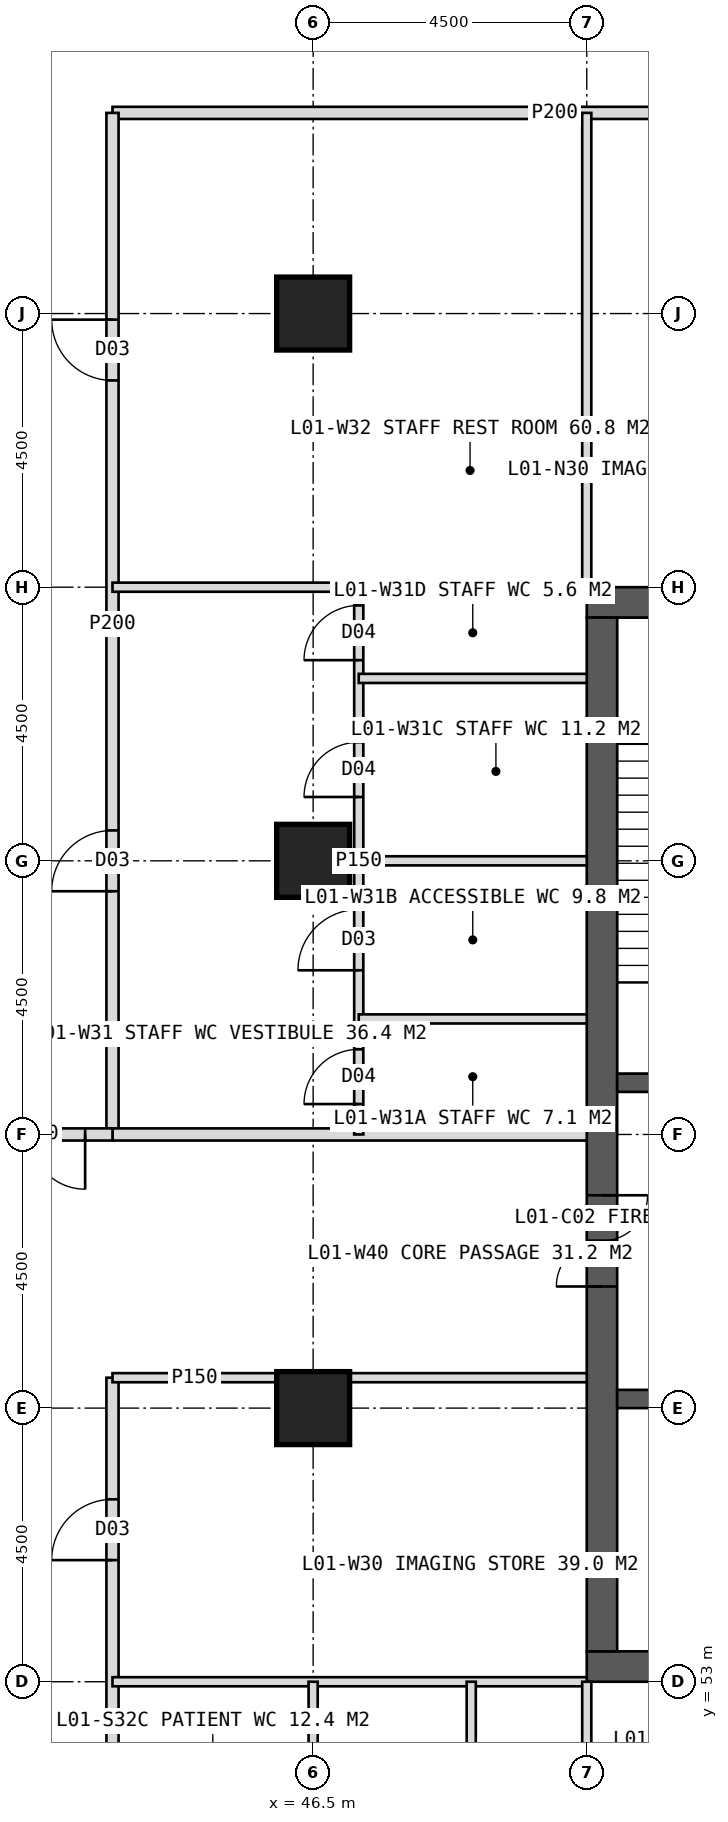
"""IFC4 building model, lengths in metres.
Left out: names, types, materials, properties, quantities, classifications, styles, units other than length and angle.
Written with IfcOpenShell. Run it as: python <this file> out.ifc"""

import sys

from ifc_helpers import new_model, si_unit, direction, frame, frame_2d, origin, origin_2d, place, context, subcontext, project, spatial, rectangle, hollow_rectangle, extrude, element, fill, save


model = new_model("IFC4")
c1 = context("Model", 3, precision=1e-05, world=origin(), true_north=direction((0.0, 1.0)))
c2 = subcontext(c1, "Body", "Model", "MODEL_VIEW")
j1 = project(units=[si_unit("LENGTHUNIT", "METRE"), si_unit("PLANEANGLEUNIT", "RADIAN")], contexts=[c1])
p1 = place(None, origin())
s1 = spatial("IfcSite", under=j1, at=p1, CompositionType="ELEMENT")
p2 = place(p1, origin())
s2 = spatial("IfcBuilding", under=s1, at=p2, CompositionType="ELEMENT")
p3 = place(p2, frame((0.0, 0.0, 6.0)))
s3 = spatial("IfcBuildingStorey", under=s2, at=p3, CompositionType="ELEMENT", Elevation=6.0)
p4 = place(p3, frame((51.0, 70.75, 0.0), z_axis=(0.0, 0.0, 1.0), x_axis=(1.0, 0.0, 0.0)))
e1 = element("IfcWall", 1, at=p4, inside=s3, PredefinedType="SHEAR", context=c2, shape_type="SweptSolid", body=[
    extrude(rectangle(XDim=18.0, YDim=0.5, at=frame_2d((9.0, 0.0))), origin(), (0.0, 0.0, 1.0), 5.0),
])
p5 = place(p4, frame((8.1, 0.0, 0.0)))
e2 = element("IfcOpeningElement", 2, at=p5, cuts=e1, PredefinedType="OPENING", context=c2, shape_type="SweptSolid", body=[
    extrude(rectangle(XDim=1.8, YDim=2.2, at=frame_2d((0.9, 1.1))), frame((0.0, 0.26, 0.0), z_axis=(0.0, -1.0, 0.0), x_axis=(1.0, 0.0, 0.0)), (0.0, 0.0, 1.0), 0.52),
])
p6 = place(p3, frame((51.0, 53.25, 0.0), z_axis=(0.0, 0.0, 1.0), x_axis=(1.0, 0.0, 0.0)))
e3 = element("IfcWall", 3, at=p6, inside=s3, PredefinedType="SHEAR", context=c2, shape_type="SweptSolid", body=[
    extrude(rectangle(XDim=18.0, YDim=0.5, at=frame_2d((9.0, 0.0))), origin(), (0.0, 0.0, 1.0), 5.0),
])
p7 = place(p6, frame((8.1, 0.0, 0.0)))
e4 = element("IfcOpeningElement", 4, at=p7, cuts=e3, PredefinedType="OPENING", context=c2, shape_type="SweptSolid", body=[
    extrude(rectangle(XDim=1.8, YDim=2.2, at=frame_2d((0.9, 1.1))), frame((0.0, 0.26, 0.0), z_axis=(0.0, -1.0, 0.0), x_axis=(1.0, 0.0, 0.0)), (0.0, 0.0, 1.0), 0.52),
])
p8 = place(p3, frame((51.25, 53.5, 0.0), z_axis=(0.0, 0.0, 1.0), x_axis=(0.0, 1.0, 0.0)))
e5 = element("IfcWall", 5, at=p8, inside=s3, PredefinedType="SHEAR", context=c2, shape_type="SweptSolid", body=[
    extrude(rectangle(XDim=17.0, YDim=0.5, at=frame_2d((8.5, 0.0))), origin(), (0.0, 0.0, 1.0), 5.0),
])
p9 = place(p8, frame((6.0, 0.0, 0.0)))
e6 = element("IfcOpeningElement", 6, at=p9, cuts=e5, PredefinedType="OPENING", context=c2, shape_type="SweptSolid", body=[
    extrude(rectangle(XDim=1.5, YDim=2.2, at=frame_2d((0.75, 1.1))), frame((0.0, 0.26, 0.0), z_axis=(0.0, -1.0, 0.0), x_axis=(1.0, 0.0, 0.0)), (0.0, 0.0, 1.0), 0.52),
])
p10 = place(p3, frame((51.5, 62.85, 0.0), z_axis=(0.0, 0.0, 1.0), x_axis=(1.0, 0.0, 0.0)))
e7 = element("IfcWall", 7, at=p10, inside=s3, PredefinedType="SHEAR", context=c2, shape_type="SweptSolid", body=[
    extrude(rectangle(XDim=3.3, YDim=0.3, at=frame_2d((1.65, 0.0))), origin(), (0.0, 0.0, 1.0), 5.0),
])
p11 = place(p10, frame((1.05, 0.0, 0.0)))
e8 = element("IfcOpeningElement", 8, at=p11, cuts=e7, PredefinedType="OPENING", context=c2, shape_type="SweptSolid", body=[
    extrude(rectangle(XDim=1.2, YDim=2.1, at=frame_2d((0.6, 1.05))), frame((0.0, 0.16, 0.0), z_axis=(0.0, -1.0, 0.0), x_axis=(1.0, 0.0, 0.0)), (0.0, 0.0, 1.0), 0.32),
])
p12 = place(p3, frame((51.5, 57.65, 0.0), z_axis=(0.0, 0.0, 1.0), x_axis=(1.0, 0.0, 0.0)))
e9 = element("IfcWall", 9, at=p12, inside=s3, PredefinedType="SHEAR", context=c2, shape_type="SweptSolid", body=[
    extrude(rectangle(XDim=3.3, YDim=0.3, at=frame_2d((1.65, 0.0))), origin(), (0.0, 0.0, 1.0), 5.0),
])
p13 = place(p12, frame((1.05, 0.0, 0.0)))
e10 = element("IfcOpeningElement", 10, at=p13, cuts=e9, PredefinedType="OPENING", context=c2, shape_type="SweptSolid", body=[
    extrude(rectangle(XDim=1.2, YDim=2.2, at=frame_2d((0.6, 1.1))), frame((0.0, 0.16, 0.0), z_axis=(0.0, -1.0, 0.0), x_axis=(1.0, 0.0, 0.0)), (0.0, 0.0, 1.0), 0.32),
])
for number, where, z_axis, x_axis in (
    (11, (46.5, 75.5, 0.0), (0.0, 0.0, 1.0), (1.0, 0.0, 0.0)),
    (12, (46.5, 57.5, 0.0), (0.0, 0.0, 1.0), (1.0, 0.0, 0.0)),
    (13, (46.5, 66.5, 0.0), (0.0, 0.0, 1.0), (1.0, 0.0, 0.0)),
):
    element("IfcColumn", number, at=place(p3, frame(where, z_axis=z_axis, x_axis=x_axis)), inside=s3, PredefinedType="COLUMN", context=c2, shape_type="SweptSolid", body=[
        extrude(hollow_rectangle(XDim=1.2, YDim=1.2, WallThickness=0.1, at=origin_2d()), origin(), (0.0, 0.0, 1.0), 5.0),
    ])
p14 = place(p3, frame((43.2, 78.8, 0.0), z_axis=(0.0, 0.0, 1.0), x_axis=(1.0, 0.0, 0.0)))
e14 = element("IfcWall", 14, at=p14, inside=s3, PredefinedType="PARTITIONING", context=c2, shape_type="SweptSolid", body=[
    extrude(rectangle(XDim=14.55, YDim=0.2, at=frame_2d((7.275, 0.0))), origin(), (0.0, 0.0, 1.0), 4.7),
])
p15 = place(p14, frame((10.675, 0.0, 0.0)))
e15 = element("IfcOpeningElement", 15, at=p15, cuts=e14, PredefinedType="OPENING", context=c2, shape_type="SweptSolid", body=[
    extrude(rectangle(XDim=1.0, YDim=2.1, at=frame_2d((0.5, 1.05))), frame((0.0, 0.11, 0.0), z_axis=(0.0, -1.0, 0.0), x_axis=(1.0, 0.0, 0.0)), (0.0, 0.0, 1.0), 0.22),
])
p16 = place(p3, frame((51.0, 71.0, 0.0), z_axis=(0.0, 0.0, 1.0), x_axis=(0.0, 1.0, 0.0)))
e16 = element("IfcWall", 16, at=p16, inside=s3, PredefinedType="PARTITIONING", context=c2, shape_type="SweptSolid", body=[
    extrude(rectangle(XDim=7.8, YDim=0.15, at=frame_2d((3.9, 0.0))), origin(), (0.0, 0.0, 1.0), 4.7),
])
p17 = place(p3, frame((43.2, 45.2, 0.0), z_axis=(0.0, 0.0, 1.0), x_axis=(0.0, 1.0, 0.0)))
e17 = element("IfcWall", 17, at=p17, inside=s3, PredefinedType="PARTITIONING", context=c2, shape_type="SweptSolid", body=[
    extrude(rectangle(XDim=12.8, YDim=0.2, at=frame_2d((6.4, 0.0))), origin(), (0.0, 0.0, 1.0), 4.7),
])
p18 = place(p17, frame((9.8, 0.0, 0.0)))
e18 = element("IfcOpeningElement", 18, at=p18, cuts=e17, PredefinedType="OPENING", context=c2, shape_type="SweptSolid", body=[
    extrude(rectangle(XDim=1.0, YDim=2.1, at=frame_2d((0.5, 1.05))), frame((0.0, 0.11, 0.0), z_axis=(0.0, -1.0, 0.0), x_axis=(1.0, 0.0, 0.0)), (0.0, 0.0, 1.0), 0.22),
])
p19 = place(p3, frame((43.2, 62.0, 0.0), z_axis=(0.0, 0.0, 1.0), x_axis=(0.0, 1.0, 0.0)))
e19 = element("IfcWall", 19, at=p19, inside=s3, PredefinedType="PARTITIONING", context=c2, shape_type="SweptSolid", body=[
    extrude(rectangle(XDim=16.8, YDim=0.2, at=frame_2d((8.4, 0.0))), origin(), (0.0, 0.0, 1.0), 4.7),
])
p20 = place(p19, frame((4.0, 0.0, 0.0)))
e20 = element("IfcOpeningElement", 20, at=p20, cuts=e19, PredefinedType="OPENING", context=c2, shape_type="SweptSolid", body=[
    extrude(rectangle(XDim=1.0, YDim=2.1, at=frame_2d((0.5, 1.05))), frame((0.0, 0.11, 0.0), z_axis=(0.0, -1.0, 0.0), x_axis=(1.0, 0.0, 0.0)), (0.0, 0.0, 1.0), 0.22),
])
p21 = place(p19, frame((12.4, 0.0, 0.0)))
e21 = element("IfcOpeningElement", 21, at=p21, cuts=e19, PredefinedType="OPENING", context=c2, shape_type="SweptSolid", body=[
    extrude(rectangle(XDim=1.0, YDim=2.1, at=frame_2d((0.5, 1.05))), frame((0.0, 0.11, 0.0), z_axis=(0.0, -1.0, 0.0), x_axis=(1.0, 0.0, 0.0)), (0.0, 0.0, 1.0), 0.22),
])
p22 = place(p3, frame((51.0, 53.0, 0.0), z_axis=(0.0, 0.0, 1.0), x_axis=(-1.0, 0.0, 0.0)))
e22 = element("IfcWall", 22, at=p22, inside=s3, PredefinedType="PARTITIONING", context=c2, shape_type="SweptSolid", body=[
    extrude(rectangle(XDim=7.8, YDim=0.15, at=frame_2d((3.9, 0.0))), origin(), (0.0, 0.0, 1.0), 4.7),
])
p23 = place(p3, frame((51.0, 58.0, 0.0), z_axis=(0.0, 0.0, 1.0), x_axis=(-1.0, 0.0, 0.0)))
e23 = element("IfcWall", 23, at=p23, inside=s3, PredefinedType="PARTITIONING", context=c2, shape_type="SweptSolid", body=[
    extrude(rectangle(XDim=3.9, YDim=0.15, at=frame_2d((1.95, 0.0))), origin(), (0.0, 0.0, 1.0), 4.7),
])
p24 = place(p3, frame((45.9, 58.0, 0.0), z_axis=(0.0, 0.0, 1.0), x_axis=(-1.0, 0.0, 0.0)))
e24 = element("IfcWall", 24, at=p24, inside=s3, PredefinedType="PARTITIONING", context=c2, shape_type="SweptSolid", body=[
    extrude(rectangle(XDim=2.7, YDim=0.15, at=frame_2d((1.35, 0.0))), origin(), (0.0, 0.0, 1.0), 4.7),
])
p25 = place(p3, frame((51.0, 62.0, 0.0), z_axis=(0.0, 0.0, 1.0), x_axis=(-1.0, 0.0, 0.0)))
e25 = element("IfcWall", 25, at=p25, inside=s3, PredefinedType="SOLIDWALL", context=c2, shape_type="SweptSolid", body=[
    extrude(rectangle(XDim=7.8, YDim=0.2, at=frame_2d((3.9, 0.0))), origin(), (0.0, 0.0, 1.0), 3.9),
])
p26 = place(p3, frame((51.0, 71.0, 0.0), z_axis=(0.0, 0.0, 1.0), x_axis=(-1.0, 0.0, 0.0)))
e26 = element("IfcWall", 26, at=p26, inside=s3, PredefinedType="PARTITIONING", context=c2, shape_type="SweptSolid", body=[
    extrude(rectangle(XDim=7.8, YDim=0.15, at=frame_2d((3.9, 0.0))), origin(), (0.0, 0.0, 1.0), 4.7),
])
p27 = place(p3, frame((47.25, 62.0, 0.0), z_axis=(0.0, 0.0, 1.0), x_axis=(0.0, 1.0, 0.0)))
e27 = element("IfcWall", 27, at=p27, inside=s3, PredefinedType="PARTITIONING", context=c2, shape_type="SweptSolid", body=[
    extrude(rectangle(XDim=9.0, YDim=0.15, at=frame_2d((4.5, 0.0))), origin(), (0.0, 0.0, 1.0), 4.7),
])
p28 = place(p27, frame((0.5, 0.0, 0.0)))
e28 = element("IfcOpeningElement", 28, at=p28, cuts=e27, PredefinedType="OPENING", context=c2, shape_type="SweptSolid", body=[
    extrude(rectangle(XDim=0.9, YDim=2.1, at=frame_2d((0.45, 1.05))), frame((0.0, 0.085, 0.0), z_axis=(0.0, -1.0, 0.0), x_axis=(1.0, 0.0, 0.0)), (0.0, 0.0, 1.0), 0.17),
])
p29 = place(p27, frame((2.7, 0.0, 0.0)))
e29 = element("IfcOpeningElement", 29, at=p29, cuts=e27, PredefinedType="OPENING", context=c2, shape_type="SweptSolid", body=[
    extrude(rectangle(XDim=1.0, YDim=2.1, at=frame_2d((0.5, 1.05))), frame((0.0, 0.085, 0.0), z_axis=(0.0, -1.0, 0.0), x_axis=(1.0, 0.0, 0.0)), (0.0, 0.0, 1.0), 0.17),
])
p30 = place(p27, frame((5.55, 0.0, 0.0)))
e30 = element("IfcOpeningElement", 30, at=p30, cuts=e27, PredefinedType="OPENING", context=c2, shape_type="SweptSolid", body=[
    extrude(rectangle(XDim=0.9, YDim=2.1, at=frame_2d((0.45, 1.05))), frame((0.0, 0.085, 0.0), z_axis=(0.0, -1.0, 0.0), x_axis=(1.0, 0.0, 0.0)), (0.0, 0.0, 1.0), 0.17),
])
p31 = place(p27, frame((7.8, 0.0, 0.0)))
e31 = element("IfcOpeningElement", 31, at=p31, cuts=e27, PredefinedType="OPENING", context=c2, shape_type="SweptSolid", body=[
    extrude(rectangle(XDim=0.9, YDim=2.1, at=frame_2d((0.45, 1.05))), frame((0.0, 0.085, 0.0), z_axis=(0.0, -1.0, 0.0), x_axis=(1.0, 0.0, 0.0)), (0.0, 0.0, 1.0), 0.17),
])
p32 = place(p3, frame((51.0, 63.9, 0.0), z_axis=(0.0, 0.0, 1.0), x_axis=(-1.0, 0.0, 0.0)))
e32 = element("IfcWall", 32, at=p32, inside=s3, PredefinedType="PARTITIONING", context=c2, shape_type="SweptSolid", body=[
    extrude(rectangle(XDim=3.75, YDim=0.15, at=frame_2d((1.875, 0.0))), origin(), (0.0, 0.0, 1.0), 4.7),
])
p33 = place(p3, frame((51.0, 66.5, 0.0), z_axis=(0.0, 0.0, 1.0), x_axis=(-1.0, 0.0, 0.0)))
e33 = element("IfcWall", 33, at=p33, inside=s3, PredefinedType="PARTITIONING", context=c2, shape_type="SweptSolid", body=[
    extrude(rectangle(XDim=3.75, YDim=0.15, at=frame_2d((1.875, 0.0))), origin(), (0.0, 0.0, 1.0), 3.8),
])
p34 = place(p3, frame((51.0, 69.5, 0.0), z_axis=(0.0, 0.0, 1.0), x_axis=(-1.0, 0.0, 0.0)))
e34 = element("IfcWall", 34, at=p34, inside=s3, PredefinedType="PARTITIONING", context=c2, shape_type="SweptSolid", body=[
    extrude(rectangle(XDim=3.75, YDim=0.15, at=frame_2d((1.875, 0.0))), origin(), (0.0, 0.0, 1.0), 4.7),
])
p35 = place(p3, frame((51.0, 53.0, 0.0), z_axis=(0.0, 0.0, 1.0), x_axis=(0.0, -1.0, 0.0)))
e35 = element("IfcWall", 35, at=p35, inside=s3, PredefinedType="PARTITIONING", context=c2, shape_type="SweptSolid", body=[
    extrude(rectangle(XDim=7.8, YDim=0.15, at=frame_2d((3.9, 0.0))), origin(), (0.0, 0.0, 1.0), 4.7),
])
p36 = place(p3, frame((49.1, 53.0, 0.0), z_axis=(0.0, 0.0, 1.0), x_axis=(0.0, -1.0, 0.0)))
e36 = element("IfcWall", 36, at=p36, inside=s3, PredefinedType="PARTITIONING", context=c2, shape_type="SweptSolid", body=[
    extrude(rectangle(XDim=3.75, YDim=0.15, at=frame_2d((1.875, 0.0))), origin(), (0.0, 0.0, 1.0), 4.7),
])
p37 = place(p3, frame((46.5, 53.0, 0.0), z_axis=(0.0, 0.0, 1.0), x_axis=(0.0, -1.0, 0.0)))
e37 = element("IfcWall", 37, at=p37, inside=s3, PredefinedType="PARTITIONING", context=c2, shape_type="SweptSolid", body=[
    extrude(rectangle(XDim=3.75, YDim=0.15, at=frame_2d((1.875, 0.0))), origin(), (0.0, 0.0, 1.0), 3.9),
])
p38 = place(p3, frame((43.2, 62.0, 0.0), z_axis=(0.0, 0.0, 1.0), x_axis=(-1.0, 0.0, 0.0)))
e38 = element("IfcWall", 38, at=p38, inside=s3, PredefinedType="SOLIDWALL", context=c2, shape_type="SweptSolid", body=[
    extrude(rectangle(XDim=2.7, YDim=0.2, at=frame_2d((1.35, 0.0))), origin(), (0.0, 0.0, 1.0), 3.9),
])
p39 = place(p38, frame((0.45, 0.0, 0.0)))
e39 = element("IfcOpeningElement", 39, at=p39, cuts=e38, PredefinedType="OPENING", context=c2, shape_type="SweptSolid", body=[
    extrude(rectangle(XDim=1.8, YDim=2.2, at=frame_2d((0.9, 1.1))), frame((0.0, 0.11, 0.0), z_axis=(0.0, -1.0, 0.0), x_axis=(1.0, 0.0, 0.0)), (0.0, 0.0, 1.0), 0.22),
])
p40 = place(p18, origin())
e40 = element("IfcDoor", 40, at=p40, inside=s3, OperationType="SINGLE_SWING_LEFT", PredefinedType="DOOR", context=c2, shape_type="SweptSolid", body=[
    extrude(rectangle(XDim=1.0, YDim=2.1, at=frame_2d((0.5, 1.05))), frame((0.0, 0.025, 0.0), z_axis=(0.0, -1.0, 0.0), x_axis=(1.0, 0.0, 0.0)), (0.0, 0.0, 1.0), 0.05),
])
fill(e18, e40)
p41 = place(p20, origin())
e41 = element("IfcDoor", 41, at=p41, inside=s3, OperationType="SINGLE_SWING_LEFT", PredefinedType="DOOR", context=c2, shape_type="SweptSolid", body=[
    extrude(rectangle(XDim=1.0, YDim=2.1, at=frame_2d((0.5, 1.05))), frame((0.0, 0.025, 0.0), z_axis=(0.0, -1.0, 0.0), x_axis=(1.0, 0.0, 0.0)), (0.0, 0.0, 1.0), 0.05),
])
fill(e20, e41)
p42 = place(p21, origin())
e42 = element("IfcDoor", 42, at=p42, inside=s3, OperationType="SINGLE_SWING_RIGHT", PredefinedType="DOOR", context=c2, shape_type="SweptSolid", body=[
    extrude(rectangle(XDim=1.0, YDim=2.1, at=frame_2d((0.5, 1.05))), frame((0.0, 0.025, 0.0), z_axis=(0.0, -1.0, 0.0), x_axis=(1.0, 0.0, 0.0)), (0.0, 0.0, 1.0), 0.05),
])
fill(e21, e42)
p43 = place(p39, origin())
e43 = element("IfcDoor", 43, at=p43, inside=s3, OperationType="DOUBLE_DOOR_DOUBLE_SWING", PredefinedType="DOOR", context=c2, shape_type="SweptSolid", body=[
    extrude(rectangle(XDim=1.8, YDim=2.2, at=frame_2d((0.9, 1.1))), frame((0.0, 0.025, 0.0), z_axis=(0.0, -1.0, 0.0), x_axis=(1.0, 0.0, 0.0)), (0.0, 0.0, 1.0), 0.05),
])
fill(e39, e43)
p44 = place(p9, origin())
e44 = element("IfcDoor", 44, at=p44, inside=s3, OperationType="DOUBLE_DOOR_SINGLE_SWING", PredefinedType="DOOR", context=c2, shape_type="SweptSolid", body=[
    extrude(rectangle(XDim=1.5, YDim=2.2, at=frame_2d((0.75, 1.1))), frame((0.0, 0.025, 0.0), z_axis=(0.0, -1.0, 0.0), x_axis=(1.0, 0.0, 0.0)), (0.0, 0.0, 1.0), 0.05),
])
fill(e6, e44)
p45 = place(p28, origin())
e45 = element("IfcDoor", 45, at=p45, inside=s3, OperationType="SINGLE_SWING_LEFT", PredefinedType="DOOR", context=c2, shape_type="SweptSolid", body=[
    extrude(rectangle(XDim=0.9, YDim=2.1, at=frame_2d((0.45, 1.05))), frame((0.0, 0.025, 0.0), z_axis=(0.0, -1.0, 0.0), x_axis=(1.0, 0.0, 0.0)), (0.0, 0.0, 1.0), 0.05),
])
fill(e28, e45)
p46 = place(p29, origin())
e46 = element("IfcDoor", 46, at=p46, inside=s3, OperationType="SINGLE_SWING_LEFT", PredefinedType="DOOR", context=c2, shape_type="SweptSolid", body=[
    extrude(rectangle(XDim=1.0, YDim=2.1, at=frame_2d((0.5, 1.05))), frame((0.0, 0.025, 0.0), z_axis=(0.0, -1.0, 0.0), x_axis=(1.0, 0.0, 0.0)), (0.0, 0.0, 1.0), 0.05),
])
fill(e29, e46)
p47 = place(p30, origin())
e47 = element("IfcDoor", 47, at=p47, inside=s3, OperationType="SINGLE_SWING_LEFT", PredefinedType="DOOR", context=c2, shape_type="SweptSolid", body=[
    extrude(rectangle(XDim=0.9, YDim=2.1, at=frame_2d((0.45, 1.05))), frame((0.0, 0.025, 0.0), z_axis=(0.0, -1.0, 0.0), x_axis=(1.0, 0.0, 0.0)), (0.0, 0.0, 1.0), 0.05),
])
fill(e30, e47)
p48 = place(p31, origin())
e48 = element("IfcDoor", 48, at=p48, inside=s3, OperationType="SINGLE_SWING_LEFT", PredefinedType="DOOR", context=c2, shape_type="SweptSolid", body=[
    extrude(rectangle(XDim=0.9, YDim=2.1, at=frame_2d((0.45, 1.05))), frame((0.0, 0.025, 0.0), z_axis=(0.0, -1.0, 0.0), x_axis=(1.0, 0.0, 0.0)), (0.0, 0.0, 1.0), 0.05),
])
fill(e31, e48)
save(model, sys.argv[1])
